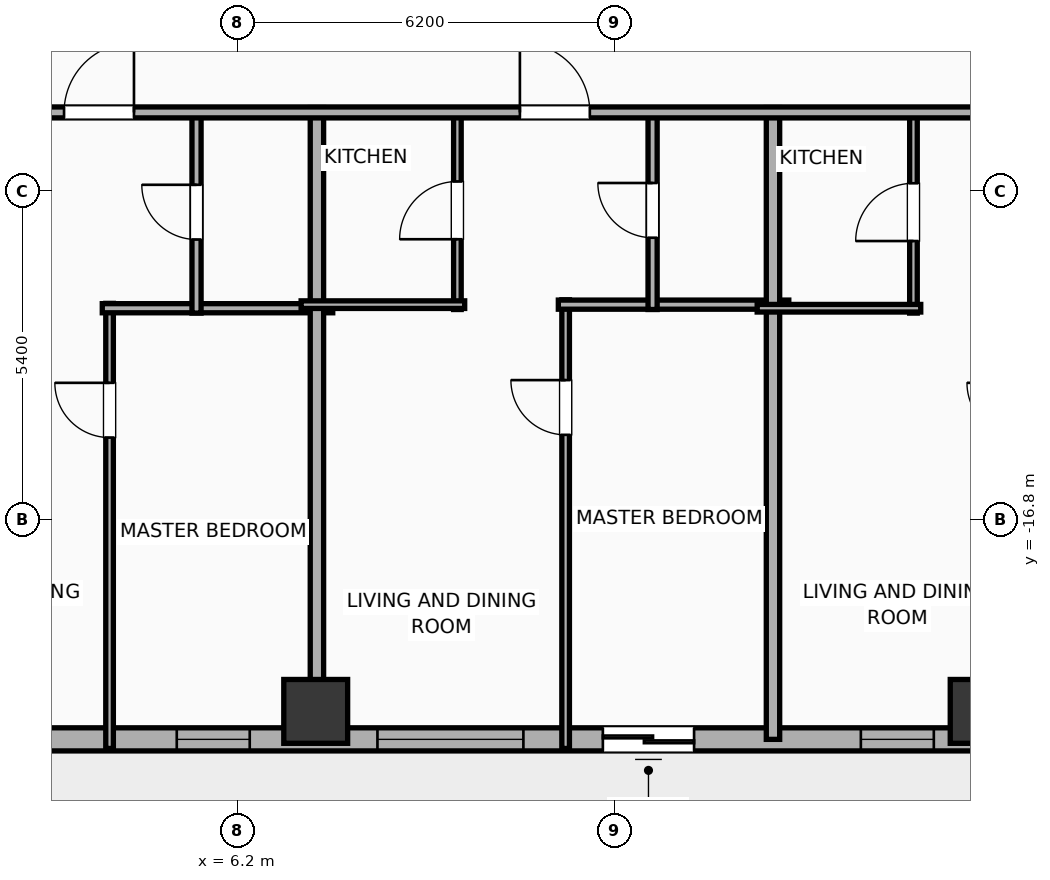
"""IFC4 building model, lengths in metres.
Left out: names, types, materials, properties, quantities, classifications, styles, units other than length and angle.
Written with IfcOpenShell. Run it as: python <this file> out.ifc"""

import sys

from ifc_helpers import new_model, si_unit, direction, frame, frame_2d, origin, origin_2d, place, context, subcontext, project, spatial, rectangle, hollow_rectangle, extrude, element, fill, save


model = new_model("IFC4")
c1 = context("Model", 3, precision=1e-05, world=origin(), true_north=direction((0.0, 1.0)))
c2 = subcontext(c1, "Body", "Model", "MODEL_VIEW")
j1 = project(units=[si_unit("LENGTHUNIT", "METRE"), si_unit("PLANEANGLEUNIT", "RADIAN")], contexts=[c1])
p1 = place(None, origin())
s1 = spatial("IfcSite", under=j1, at=p1, CompositionType="ELEMENT")
p2 = place(p1, origin())
s2 = spatial("IfcBuilding", under=s1, at=p2, CompositionType="ELEMENT")
p3 = place(p2, frame((0.0, 0.0, 113.1)))
s3 = spatial("IfcBuildingStorey", under=s2, at=p3, CompositionType="ELEMENT", Elevation=113.1)
for number, where, z_axis, x_axis in (
    (1, (7.48, -19.95, 0.0), (0.0, 0.0, 1.0), (1.0, 0.0, 0.0)),
    (2, (18.44, -19.95, 0.0), (0.0, 0.0, 1.0), (1.0, 0.0, 0.0)),
):
    element("IfcColumn", number, at=place(p3, frame(where, z_axis=z_axis, x_axis=x_axis)), inside=s3, PredefinedType="COLUMN", context=c2, shape_type="SweptSolid", body=[
        extrude(hollow_rectangle(XDim=1.05, YDim=1.05, WallThickness=0.036, at=origin_2d()), origin(), (0.0, 0.0, 1.0), 3.9),
    ])
p4 = place(p3, frame((29.381, -20.41, 0.0), z_axis=(0.0, 0.0, 1.0), x_axis=(-1.0, 0.0, 0.0)))
e3 = element("IfcWall", 3, at=p4, inside=s3, PredefinedType="ELEMENTEDWALL", context=c2, shape_type="SweptSolid", body=[
    extrude(rectangle(XDim=54.763, YDim=0.38, at=frame_2d((27.381, 0.0))), origin(), (0.0, 0.0, 1.0), 3.65),
])
p5 = place(p4, frame((15.679, 0.0, 0.0)))
e4 = element("IfcOpeningElement", 4, at=p5, cuts=e3, PredefinedType="OPENING", context=c2, shape_type="SweptSolid", body=[
    extrude(rectangle(XDim=1.5, YDim=2.05, at=frame_2d((0.75, 1.025))), frame((0.0, 0.2, 0.0), z_axis=(0.0, -1.0, 0.0), x_axis=(1.0, 0.0, 0.0)), (0.0, 0.0, 1.0), 0.4),
])
p6 = place(p4, frame((7.295, 0.0, 0.75)))
e5 = element("IfcOpeningElement", 5, at=p6, cuts=e3, PredefinedType="OPENING", context=c2, shape_type="SweptSolid", body=[
    extrude(rectangle(XDim=2.4, YDim=2.1, at=frame_2d((1.2, 1.05))), frame((0.0, 0.2, 0.0), z_axis=(0.0, -1.0, 0.0), x_axis=(1.0, 0.0, 0.0)), (0.0, 0.0, 1.0), 0.4),
])
p7 = place(p4, frame((18.486, 0.0, 0.75)))
e6 = element("IfcOpeningElement", 6, at=p7, cuts=e3, PredefinedType="OPENING", context=c2, shape_type="SweptSolid", body=[
    extrude(rectangle(XDim=2.4, YDim=2.1, at=frame_2d((1.2, 1.05))), frame((0.0, 0.2, 0.0), z_axis=(0.0, -1.0, 0.0), x_axis=(1.0, 0.0, 0.0)), (0.0, 0.0, 1.0), 0.4),
])
p8 = place(p4, frame((33.877, 0.0, 0.75)))
e7 = element("IfcOpeningElement", 7, at=p8, cuts=e3, PredefinedType="OPENING", context=c2, shape_type="SweptSolid", body=[
    extrude(rectangle(XDim=2.4, YDim=2.1, at=frame_2d((1.2, 1.05))), frame((0.0, 0.2, 0.0), z_axis=(0.0, -1.0, 0.0), x_axis=(1.0, 0.0, 0.0)), (0.0, 0.0, 1.0), 0.4),
])
p9 = place(p4, frame((48.367, 0.0, 0.75)))
e8 = element("IfcOpeningElement", 8, at=p9, cuts=e3, PredefinedType="OPENING", context=c2, shape_type="SweptSolid", body=[
    extrude(rectangle(XDim=2.4, YDim=2.1, at=frame_2d((1.2, 1.05))), frame((0.0, 0.2, 0.0), z_axis=(0.0, -1.0, 0.0), x_axis=(1.0, 0.0, 0.0)), (0.0, 0.0, 1.0), 0.4),
])
p10 = place(p4, frame((37.584, 0.0, 0.0)))
e9 = element("IfcOpeningElement", 9, at=p10, cuts=e3, PredefinedType="OPENING", context=c2, shape_type="SweptSolid", body=[
    extrude(rectangle(XDim=1.5, YDim=2.05, at=frame_2d((0.75, 1.025))), frame((0.0, 0.2, 0.0), z_axis=(0.0, -1.0, 0.0), x_axis=(1.0, 0.0, 0.0)), (0.0, 0.0, 1.0), 0.4),
])
p11 = place(p4, frame((52.277, 0.0, 0.75)))
e10 = element("IfcOpeningElement", 10, at=p11, cuts=e3, PredefinedType="OPENING", context=c2, shape_type="SweptSolid", body=[
    extrude(rectangle(XDim=1.2, YDim=2.05, at=frame_2d((0.6, 1.025))), frame((0.0, 0.2, 0.0), z_axis=(0.0, -1.0, 0.0), x_axis=(1.0, 0.0, 0.0)), (0.0, 0.0, 1.0), 0.4),
])
p12 = place(p4, frame((45.486, 0.0, 0.75)))
e11 = element("IfcOpeningElement", 11, at=p12, cuts=e3, PredefinedType="OPENING", context=c2, shape_type="SweptSolid", body=[
    extrude(rectangle(XDim=1.2, YDim=2.05, at=frame_2d((0.6, 1.025))), frame((0.0, 0.2, 0.0), z_axis=(0.0, -1.0, 0.0), x_axis=(1.0, 0.0, 0.0)), (0.0, 0.0, 1.0), 0.4),
])
p13 = place(p4, frame((41.736, 0.0, 0.75)))
e12 = element("IfcOpeningElement", 12, at=p13, cuts=e3, PredefinedType="OPENING", context=c2, shape_type="SweptSolid", body=[
    extrude(rectangle(XDim=1.2, YDim=2.05, at=frame_2d((0.6, 1.025))), frame((0.0, 0.2, 0.0), z_axis=(0.0, -1.0, 0.0), x_axis=(1.0, 0.0, 0.0)), (0.0, 0.0, 1.0), 0.4),
])
p14 = place(p4, frame((30.486, 0.0, 0.75)))
e13 = element("IfcOpeningElement", 13, at=p14, cuts=e3, PredefinedType="OPENING", context=c2, shape_type="SweptSolid", body=[
    extrude(rectangle(XDim=1.2, YDim=2.05, at=frame_2d((0.6, 1.025))), frame((0.0, 0.2, 0.0), z_axis=(0.0, -1.0, 0.0), x_axis=(1.0, 0.0, 0.0)), (0.0, 0.0, 1.0), 0.4),
])
p15 = place(p4, frame((26.736, 0.0, 0.75)))
e14 = element("IfcOpeningElement", 14, at=p15, cuts=e3, PredefinedType="OPENING", context=c2, shape_type="SweptSolid", body=[
    extrude(rectangle(XDim=1.2, YDim=2.05, at=frame_2d((0.6, 1.025))), frame((0.0, 0.2, 0.0), z_axis=(0.0, -1.0, 0.0), x_axis=(1.0, 0.0, 0.0)), (0.0, 0.0, 1.0), 0.4),
])
p16 = place(p4, frame((22.986, 0.0, 0.75)))
e15 = element("IfcOpeningElement", 15, at=p16, cuts=e3, PredefinedType="OPENING", context=c2, shape_type="SweptSolid", body=[
    extrude(rectangle(XDim=1.2, YDim=2.05, at=frame_2d((0.6, 1.025))), frame((0.0, 0.2, 0.0), z_axis=(0.0, -1.0, 0.0), x_axis=(1.0, 0.0, 0.0)), (0.0, 0.0, 1.0), 0.4),
])
p17 = place(p4, frame((11.736, 0.0, 0.75)))
e16 = element("IfcOpeningElement", 16, at=p17, cuts=e3, PredefinedType="OPENING", context=c2, shape_type="SweptSolid", body=[
    extrude(rectangle(XDim=1.2, YDim=2.05, at=frame_2d((0.6, 1.025))), frame((0.0, 0.2, 0.0), z_axis=(0.0, -1.0, 0.0), x_axis=(1.0, 0.0, 0.0)), (0.0, 0.0, 1.0), 0.4),
])
p18 = place(p4, frame((3.286, 0.0, 0.75)))
e17 = element("IfcOpeningElement", 17, at=p18, cuts=e3, PredefinedType="OPENING", context=c2, shape_type="SweptSolid", body=[
    extrude(rectangle(XDim=1.2, YDim=2.05, at=frame_2d((0.6, 1.025))), frame((0.0, 0.2, 0.0), z_axis=(0.0, -1.0, 0.0), x_axis=(1.0, 0.0, 0.0)), (0.0, 0.0, 1.0), 0.4),
])
p19 = place(p3, frame((4.09, -20.56, 0.0), z_axis=(0.0, 0.0, 1.0), x_axis=(0.0, 1.0, 0.0)))
e18 = element("IfcWall", 18, at=p19, inside=s3, PredefinedType="PARTITIONING", context=c2, shape_type="SweptSolid", body=[
    extrude(rectangle(XDim=7.32, YDim=0.125, at=frame_2d((3.66, 0.0))), origin(), (0.0, 0.0, 1.0), 3.65),
])
p20 = place(p19, frame((5.113, 0.0, 0.0)))
e19 = element("IfcOpeningElement", 19, at=p20, cuts=e18, PredefinedType="OPENING", context=c2, shape_type="SweptSolid", body=[
    extrude(rectangle(XDim=0.9, YDim=2.05, at=frame_2d((0.45, 1.025))), frame((0.0, 0.073, 0.0), z_axis=(0.0, -1.0, 0.0), x_axis=(1.0, 0.0, 0.0)), (0.0, 0.0, 1.0), 0.145),
])
p21 = place(p3, frame((3.97, -13.32, 0.0), z_axis=(0.0, 0.0, 1.0), x_axis=(1.0, 0.0, 0.0)))
e20 = element("IfcWall", 20, at=p21, inside=s3, PredefinedType="PLUMBINGWALL", context=c2, shape_type="SweptSolid", body=[
    extrude(rectangle(XDim=3.79, YDim=0.15, at=frame_2d((1.895, 0.0))), origin(), (0.0, 0.0, 1.0), 3.65),
])
p22 = place(p3, frame((5.52, -13.4, 0.0), z_axis=(0.0, 0.0, 1.0), x_axis=(0.0, 1.0, 0.0)))
e21 = element("IfcWall", 21, at=p22, inside=s3, PredefinedType="PLUMBINGWALL", context=c2, shape_type="SweptSolid", body=[
    extrude(rectangle(XDim=3.32, YDim=0.15, at=frame_2d((1.66, 0.0))), origin(), (0.0, 0.0, 1.0), 3.04),
])
p23 = place(p22, frame((1.21, 0.0, 0.0)))
e22 = element("IfcOpeningElement", 22, at=p23, cuts=e21, PredefinedType="OPENING", context=c2, shape_type="SweptSolid", body=[
    extrude(rectangle(XDim=0.9, YDim=2.05, at=frame_2d((0.45, 1.025))), frame((0.0, 0.085, 0.0), z_axis=(0.0, -1.0, 0.0), x_axis=(1.0, 0.0, 0.0)), (0.0, 0.0, 1.0), 0.17),
])
p24 = place(p3, frame((7.5, -20.41, 0.0), z_axis=(0.0, 0.0, 1.0), x_axis=(0.0, 1.0, 0.0)))
e23 = element("IfcWall", 23, at=p24, inside=s3, PredefinedType="PARTITIONING", context=c2, shape_type="SweptSolid", body=[
    extrude(rectangle(XDim=10.39, YDim=0.22, at=frame_2d((5.195, 0.0))), origin(), (0.0, 0.0, 1.0), 3.04),
])
p25 = place(p3, frame((11.59, -20.56, 0.0), z_axis=(0.0, 0.0, 1.0), x_axis=(0.0, 1.0, 0.0)))
e24 = element("IfcWall", 24, at=p25, inside=s3, PredefinedType="PARTITIONING", context=c2, shape_type="SweptSolid", body=[
    extrude(rectangle(XDim=7.379, YDim=0.125, at=frame_2d((3.689, 0.0))), origin(), (0.0, 0.0, 1.0), 3.65),
])
p26 = place(p25, frame((5.158, 0.0, 0.0)))
e25 = element("IfcOpeningElement", 25, at=p26, cuts=e24, PredefinedType="OPENING", context=c2, shape_type="SweptSolid", body=[
    extrude(rectangle(XDim=0.9, YDim=2.05, at=frame_2d((0.45, 1.025))), frame((0.0, 0.073, 0.0), z_axis=(0.0, -1.0, 0.0), x_axis=(1.0, 0.0, 0.0)), (0.0, 0.0, 1.0), 0.145),
])
p27 = place(p3, frame((11.47, -13.261, 0.0), z_axis=(0.0, 0.0, 1.0), x_axis=(1.0, 0.0, 0.0)))
e26 = element("IfcWall", 26, at=p27, inside=s3, PredefinedType="PLUMBINGWALL", context=c2, shape_type="SweptSolid", body=[
    extrude(rectangle(XDim=3.79, YDim=0.15, at=frame_2d((1.895, 0.0))), origin(), (0.0, 0.0, 1.0), 3.65),
])
p28 = place(p3, frame((9.81, -13.341, 0.0), z_axis=(0.0, 0.0, 1.0), x_axis=(0.0, 1.0, 0.0)))
e27 = element("IfcWall", 27, at=p28, inside=s3, PredefinedType="PARTITIONING", context=c2, shape_type="SweptSolid", body=[
    extrude(rectangle(XDim=3.261, YDim=0.125, at=frame_2d((1.63, 0.0))), origin(), (0.0, 0.0, 1.0), 3.65),
])
p29 = place(p28, frame((1.156, 0.0, 0.0)))
e28 = element("IfcOpeningElement", 28, at=p29, cuts=e27, PredefinedType="OPENING", context=c2, shape_type="SweptSolid", body=[
    extrude(rectangle(XDim=0.95, YDim=2.05, at=frame_2d((0.475, 1.025))), frame((0.0, 0.073, 0.0), z_axis=(0.0, -1.0, 0.0), x_axis=(1.0, 0.0, 0.0)), (0.0, 0.0, 1.0), 0.145),
])
p30 = place(p3, frame((7.24, -13.261, 0.0), z_axis=(0.0, 0.0, 1.0), x_axis=(1.0, 0.0, 0.0)))
e29 = element("IfcWall", 29, at=p30, inside=s3, PredefinedType="PARTITIONING", context=c2, shape_type="SweptSolid", body=[
    extrude(rectangle(XDim=2.69, YDim=0.125, at=frame_2d((1.345, 0.0))), origin(), (0.0, 0.0, 1.0), 3.65),
])
p31 = place(p3, frame((13.02, -13.341, 0.0), z_axis=(0.0, 0.0, 1.0), x_axis=(0.0, 1.0, 0.0)))
e30 = element("IfcWall", 30, at=p31, inside=s3, PredefinedType="PLUMBINGWALL", context=c2, shape_type="SweptSolid", body=[
    extrude(rectangle(XDim=3.261, YDim=0.15, at=frame_2d((1.63, 0.0))), origin(), (0.0, 0.0, 1.0), 3.65),
])
p32 = place(p31, frame((1.18, 0.0, 0.0)))
e31 = element("IfcOpeningElement", 31, at=p32, cuts=e30, PredefinedType="OPENING", context=c2, shape_type="SweptSolid", body=[
    extrude(rectangle(XDim=0.9, YDim=2.05, at=frame_2d((0.45, 1.025))), frame((0.0, 0.085, 0.0), z_axis=(0.0, -1.0, 0.0), x_axis=(1.0, 0.0, 0.0)), (0.0, 0.0, 1.0), 0.17),
])
p33 = place(p3, frame((15.0, -20.41, 0.0), z_axis=(0.0, 0.0, 1.0), x_axis=(0.0, 1.0, 0.0)))
e32 = element("IfcWall", 32, at=p33, inside=s3, PredefinedType="PARTITIONING", context=c2, shape_type="SweptSolid", body=[
    extrude(rectangle(XDim=10.39, YDim=0.22, at=frame_2d((5.195, 0.0))), origin(), (0.0, 0.0, 1.0), 3.65),
])
p34 = place(p3, frame((17.31, -13.4, 0.0), z_axis=(0.0, 0.0, 1.0), x_axis=(0.0, 1.0, 0.0)))
e33 = element("IfcWall", 33, at=p34, inside=s3, PredefinedType="PARTITIONING", context=c2, shape_type="SweptSolid", body=[
    extrude(rectangle(XDim=3.32, YDim=0.125, at=frame_2d((1.66, 0.0))), origin(), (0.0, 0.0, 1.0), 3.65),
])
p35 = place(p34, frame((1.185, 0.0, 0.0)))
e34 = element("IfcOpeningElement", 34, at=p35, cuts=e33, PredefinedType="OPENING", context=c2, shape_type="SweptSolid", body=[
    extrude(rectangle(XDim=0.95, YDim=2.05, at=frame_2d((0.475, 1.025))), frame((0.0, 0.073, 0.0), z_axis=(0.0, -1.0, 0.0), x_axis=(1.0, 0.0, 0.0)), (0.0, 0.0, 1.0), 0.145),
])
p36 = place(p3, frame((14.74, -13.32, 0.0), z_axis=(0.0, 0.0, 1.0), x_axis=(1.0, 0.0, 0.0)))
e35 = element("IfcWall", 35, at=p36, inside=s3, PredefinedType="PARTITIONING", context=c2, shape_type="SweptSolid", body=[
    extrude(rectangle(XDim=2.69, YDim=0.125, at=frame_2d((1.345, 0.0))), origin(), (0.0, 0.0, 1.0), 3.65),
])
p37 = place(p3, frame((-29.21, -10.1, 0.0), z_axis=(0.0, 0.0, 1.0), x_axis=(1.0, 0.0, 0.0)))
e36 = element("IfcWall", 36, at=p37, inside=s3, PredefinedType="PARTITIONING", context=c2, shape_type="SweptSolid", body=[
    extrude(rectangle(XDim=62.42, YDim=0.18, at=frame_2d((31.21, 0.0))), origin(), (0.0, 0.0, 1.0), 3.65),
])
p38 = place(p37, frame((3.002, 0.0, 0.0)))
e37 = element("IfcOpeningElement", 37, at=p38, cuts=e36, PredefinedType="OPENING", context=c2, shape_type="SweptSolid", body=[
    extrude(rectangle(XDim=0.9, YDim=2.05, at=frame_2d((0.45, 1.025))), frame((0.0, 0.1, 0.0), z_axis=(0.0, -1.0, 0.0), x_axis=(1.0, 0.0, 0.0)), (0.0, 0.0, 1.0), 0.2),
])
p39 = place(p37, frame((10.049, 0.0, 0.0)))
e38 = element("IfcOpeningElement", 38, at=p39, cuts=e36, PredefinedType="OPENING", context=c2, shape_type="SweptSolid", body=[
    extrude(rectangle(XDim=1.15, YDim=2.05, at=frame_2d((0.575, 1.025))), frame((0.0, 0.1, 0.0), z_axis=(0.0, -1.0, 0.0), x_axis=(1.0, 0.0, 0.0)), (0.0, 0.0, 1.0), 0.2),
])
p40 = place(p37, frame((17.552, 0.0, 0.0)))
e39 = element("IfcOpeningElement", 39, at=p40, cuts=e36, PredefinedType="OPENING", context=c2, shape_type="SweptSolid", body=[
    extrude(rectangle(XDim=1.15, YDim=2.05, at=frame_2d((0.575, 1.025))), frame((0.0, 0.1, 0.0), z_axis=(0.0, -1.0, 0.0), x_axis=(1.0, 0.0, 0.0)), (0.0, 0.0, 1.0), 0.2),
])
p41 = place(p37, frame((25.048, 0.0, 0.0)))
e40 = element("IfcOpeningElement", 40, at=p41, cuts=e36, PredefinedType="OPENING", context=c2, shape_type="SweptSolid", body=[
    extrude(rectangle(XDim=1.15, YDim=2.05, at=frame_2d((0.575, 1.025))), frame((0.0, 0.1, 0.0), z_axis=(0.0, -1.0, 0.0), x_axis=(1.0, 0.0, 0.0)), (0.0, 0.0, 1.0), 0.2),
])
p42 = place(p37, frame((32.551, 0.0, 0.0)))
e41 = element("IfcOpeningElement", 41, at=p42, cuts=e36, PredefinedType="OPENING", context=c2, shape_type="SweptSolid", body=[
    extrude(rectangle(XDim=1.15, YDim=2.05, at=frame_2d((0.575, 1.025))), frame((0.0, 0.1, 0.0), z_axis=(0.0, -1.0, 0.0), x_axis=(1.0, 0.0, 0.0)), (0.0, 0.0, 1.0), 0.2),
])
p43 = place(p37, frame((40.048, 0.0, 0.0)))
e42 = element("IfcOpeningElement", 42, at=p43, cuts=e36, PredefinedType="OPENING", context=c2, shape_type="SweptSolid", body=[
    extrude(rectangle(XDim=1.15, YDim=2.05, at=frame_2d((0.575, 1.025))), frame((0.0, 0.1, 0.0), z_axis=(0.0, -1.0, 0.0), x_axis=(1.0, 0.0, 0.0)), (0.0, 0.0, 1.0), 0.2),
])
p44 = place(p37, frame((47.551, 0.0, 0.0)))
e43 = element("IfcOpeningElement", 43, at=p44, cuts=e36, PredefinedType="OPENING", context=c2, shape_type="SweptSolid", body=[
    extrude(rectangle(XDim=1.15, YDim=2.05, at=frame_2d((0.575, 1.025))), frame((0.0, 0.1, 0.0), z_axis=(0.0, -1.0, 0.0), x_axis=(1.0, 0.0, 0.0)), (0.0, 0.0, 1.0), 0.2),
])
p45 = place(p37, frame((57.064, 0.0, 0.0)))
e44 = element("IfcOpeningElement", 44, at=p45, cuts=e36, PredefinedType="OPENING", context=c2, shape_type="SweptSolid", body=[
    extrude(rectangle(XDim=1.15, YDim=2.05, at=frame_2d((0.575, 1.025))), frame((0.0, 0.1, 0.0), z_axis=(0.0, -1.0, 0.0), x_axis=(1.0, 0.0, 0.0)), (0.0, 0.0, 1.0), 0.2),
])
p46 = place(p5, origin())
e45 = element("IfcDoor", 45, at=p46, inside=s3, OperationType="SLIDING_TO_RIGHT", PredefinedType="DOOR", context=c2, shape_type="SweptSolid", body=[
    extrude(rectangle(XDim=1.5, YDim=2.05, at=frame_2d((0.75, 1.025))), frame((0.0, 0.025, 0.0), z_axis=(0.0, -1.0, 0.0), x_axis=(1.0, 0.0, 0.0)), (0.0, 0.0, 1.0), 0.05),
])
fill(e4, e45)
p47 = place(p7, origin())
e46 = element("IfcWindow", 46, at=p47, inside=s3, PartitioningType="SINGLE_PANEL", PredefinedType="WINDOW", context=c2, shape_type="SweptSolid", body=[
    extrude(rectangle(XDim=2.4, YDim=2.1, at=frame_2d((1.2, 1.05))), frame((0.0, 0.03, 0.0), z_axis=(0.0, -1.0, 0.0), x_axis=(1.0, 0.0, 0.0)), (0.0, 0.0, 1.0), 0.06),
])
fill(e6, e46)
p48 = place(p16, origin())
e47 = element("IfcWindow", 47, at=p48, inside=s3, PartitioningType="SINGLE_PANEL", PredefinedType="WINDOW", context=c2, shape_type="SweptSolid", body=[
    extrude(rectangle(XDim=1.2, YDim=2.05, at=frame_2d((0.6, 1.025))), frame((0.0, 0.03, 0.0), z_axis=(0.0, -1.0, 0.0), x_axis=(1.0, 0.0, 0.0)), (0.0, 0.0, 1.0), 0.06),
])
fill(e15, e47)
p49 = place(p17, origin())
e48 = element("IfcWindow", 48, at=p49, inside=s3, PartitioningType="SINGLE_PANEL", PredefinedType="WINDOW", context=c2, shape_type="SweptSolid", body=[
    extrude(rectangle(XDim=1.2, YDim=2.05, at=frame_2d((0.6, 1.025))), frame((0.0, 0.03, 0.0), z_axis=(0.0, -1.0, 0.0), x_axis=(1.0, 0.0, 0.0)), (0.0, 0.0, 1.0), 0.06),
])
fill(e16, e48)
p50 = place(p20, origin())
e49 = element("IfcDoor", 49, at=p50, inside=s3, OperationType="SINGLE_SWING_RIGHT", PredefinedType="DOOR", context=c2, shape_type="SweptSolid", body=[
    extrude(rectangle(XDim=0.9, YDim=2.05, at=frame_2d((0.45, 1.025))), frame((0.0, 0.025, 0.0), z_axis=(0.0, -1.0, 0.0), x_axis=(1.0, 0.0, 0.0)), (0.0, 0.0, 1.0), 0.05),
])
fill(e19, e49)
p51 = place(p23, origin())
e50 = element("IfcDoor", 50, at=p51, inside=s3, OperationType="SINGLE_SWING_RIGHT", PredefinedType="DOOR", context=c2, shape_type="SweptSolid", body=[
    extrude(rectangle(XDim=0.9, YDim=2.05, at=frame_2d((0.45, 1.025))), frame((0.0, 0.025, 0.0), z_axis=(0.0, -1.0, 0.0), x_axis=(1.0, 0.0, 0.0)), (0.0, 0.0, 1.0), 0.05),
])
fill(e22, e50)
p52 = place(p26, origin())
e51 = element("IfcDoor", 51, at=p52, inside=s3, OperationType="SINGLE_SWING_RIGHT", PredefinedType="DOOR", context=c2, shape_type="SweptSolid", body=[
    extrude(rectangle(XDim=0.9, YDim=2.05, at=frame_2d((0.45, 1.025))), frame((0.0, 0.025, 0.0), z_axis=(0.0, -1.0, 0.0), x_axis=(1.0, 0.0, 0.0)), (0.0, 0.0, 1.0), 0.05),
])
fill(e25, e51)
p53 = place(p29, origin())
e52 = element("IfcDoor", 52, at=p53, inside=s3, OperationType="SINGLE_SWING_LEFT", PredefinedType="DOOR", context=c2, shape_type="SweptSolid", body=[
    extrude(rectangle(XDim=0.95, YDim=2.05, at=frame_2d((0.475, 1.025))), frame((0.0, 0.025, 0.0), z_axis=(0.0, -1.0, 0.0), x_axis=(1.0, 0.0, 0.0)), (0.0, 0.0, 1.0), 0.05),
])
fill(e28, e52)
p54 = place(p32, origin())
e53 = element("IfcDoor", 53, at=p54, inside=s3, OperationType="SINGLE_SWING_RIGHT", PredefinedType="DOOR", context=c2, shape_type="SweptSolid", body=[
    extrude(rectangle(XDim=0.9, YDim=2.05, at=frame_2d((0.45, 1.025))), frame((0.0, 0.025, 0.0), z_axis=(0.0, -1.0, 0.0), x_axis=(1.0, 0.0, 0.0)), (0.0, 0.0, 1.0), 0.05),
])
fill(e31, e53)
p55 = place(p35, origin())
e54 = element("IfcDoor", 54, at=p55, inside=s3, OperationType="SINGLE_SWING_LEFT", PredefinedType="DOOR", context=c2, shape_type="SweptSolid", body=[
    extrude(rectangle(XDim=0.95, YDim=2.05, at=frame_2d((0.475, 1.025))), frame((0.0, 0.025, 0.0), z_axis=(0.0, -1.0, 0.0), x_axis=(1.0, 0.0, 0.0)), (0.0, 0.0, 1.0), 0.05),
])
fill(e34, e54)
p56 = place(p42, origin())
e55 = element("IfcDoor", 55, at=p56, inside=s3, OperationType="SINGLE_SWING_RIGHT", PredefinedType="DOOR", context=c2, shape_type="SweptSolid", body=[
    extrude(rectangle(XDim=1.15, YDim=2.05, at=frame_2d((0.575, 1.025))), frame((0.0, 0.025, 0.0), z_axis=(0.0, -1.0, 0.0), x_axis=(1.0, 0.0, 0.0)), (0.0, 0.0, 1.0), 0.05),
])
fill(e41, e55)
p57 = place(p43, origin())
e56 = element("IfcDoor", 56, at=p57, inside=s3, OperationType="SINGLE_SWING_LEFT", PredefinedType="DOOR", context=c2, shape_type="SweptSolid", body=[
    extrude(rectangle(XDim=1.15, YDim=2.05, at=frame_2d((0.575, 1.025))), frame((0.0, 0.025, 0.0), z_axis=(0.0, -1.0, 0.0), x_axis=(1.0, 0.0, 0.0)), (0.0, 0.0, 1.0), 0.05),
])
fill(e42, e56)
save(model, sys.argv[1])
